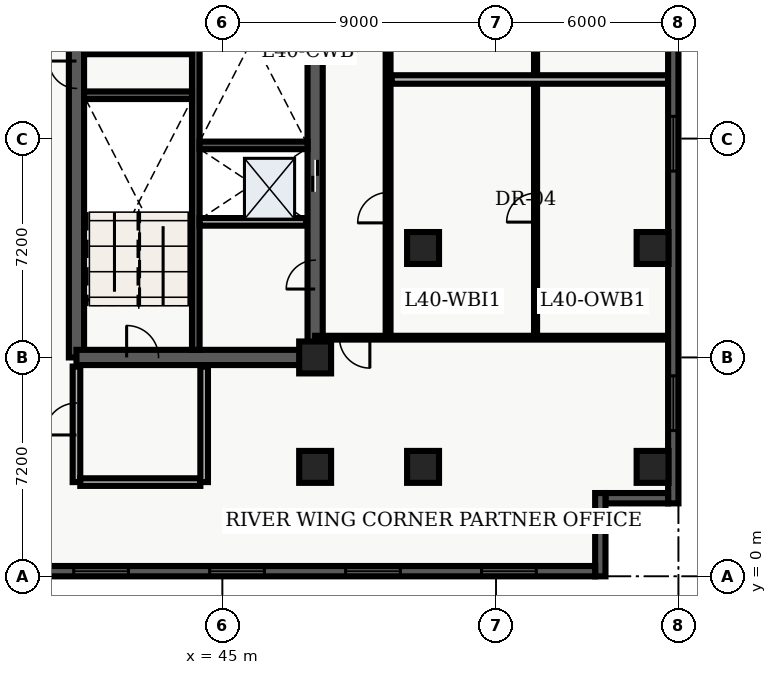
"""IFC4 building model, lengths in metres.
Left out: names, types, materials, properties, quantities, classifications, styles, units other than length and angle.
Written with IfcOpenShell. Run it as: python <this file> out.ifc"""

import sys

from ifc_helpers import new_model, entity, si_unit, converted_unit, direction, frame, origin_with_axes, origin_2d_with_axis, place, context, subcontext, project, spatial, polyline, rectangle, outline, extrude, element, fill, save


model = new_model("IFC4")
c1 = context("Model", 3, precision=1e-05, world=origin_with_axes(), true_north=direction((0.0, 1.0)))
c2 = subcontext(c1, "Body", "Model", "MODEL_VIEW")
j1 = project(units=[si_unit("LENGTHUNIT", "METRE"), converted_unit("PLANEANGLEUNIT", "DEGREE", entity("IfcPlaneAngleMeasure", 0.017), si_unit("PLANEANGLEUNIT", "RADIAN"), dimensions=[0, 0, 0, 0, 0, 0, 0])], contexts=[c1])
p1 = place(None, origin_with_axes())
s1 = spatial("IfcSite", under=j1, at=p1, CompositionType="ELEMENT")
p2 = place(p1, origin_with_axes())
s2 = spatial("IfcBuilding", under=s1, at=p2, CompositionType="ELEMENT")
p3 = place(p2, frame((0.0, 0.0, 164.1), z_axis=(0.0, 0.0, 1.0), x_axis=(1.0, 0.0, 0.0)))
s3 = spatial("IfcBuildingStorey", under=s2, at=p3, CompositionType="ELEMENT", Elevation=164.1)
p4 = place(p3, frame((40.2, 7.2, 0.0), z_axis=(0.0, 0.0, 1.0), x_axis=(0.0, 1.0, 0.0)))
e1 = element("IfcWall", 1, at=p4, inside=s3, PredefinedType="SHEAR", context=c2, shape_type="SweptSolid", body=[
    extrude(outline(polyline([(0.0, -0.25), (15.6, -0.25), (15.6, 0.25), (0.0, 0.25), (0.0, -0.25)])), origin_with_axes(), (0.0, 0.0, 1.0), 3.66),
])
p5 = place(p4, frame((14.475, 0.0, 0.0), z_axis=(0.0, 0.0, 1.0), x_axis=(1.0, 0.0, 0.0)))
e2 = element("IfcOpeningElement", 2, at=p5, cuts=e1, PredefinedType="OPENING", context=c2, shape_type="SweptSolid", body=[
    extrude(rectangle(XDim=1.05, YDim=0.52, at=origin_2d_with_axis()), origin_with_axes(), (0.0, 0.0, 1.0), 2.15),
])
p6 = place(p4, frame((12.75, 0.0, 0.0), z_axis=(0.0, 0.0, 1.0), x_axis=(1.0, 0.0, 0.0)))
e3 = element("IfcOpeningElement", 3, at=p6, cuts=e1, PredefinedType="OPENING", context=c2, shape_type="SweptSolid", body=[
    extrude(rectangle(XDim=1.2, YDim=0.52, at=origin_2d_with_axis()), origin_with_axes(), (0.0, 0.0, 1.0), 2.15),
])
p7 = place(p4, frame((9.3, 0.0, 0.0), z_axis=(0.0, 0.0, 1.0), x_axis=(1.0, 0.0, 0.0)))
e4 = element("IfcOpeningElement", 4, at=p7, cuts=e1, PredefinedType="OPENING", context=c2, shape_type="SweptSolid", body=[
    extrude(rectangle(XDim=0.9, YDim=0.52, at=origin_2d_with_axis()), origin_with_axes(), (0.0, 0.0, 1.0), 2.15),
])
p8 = place(p3, frame((40.2, 7.2, 0.0), z_axis=(0.0, 0.0, 1.0), x_axis=(1.0, 0.0, 0.0)))
e5 = element("IfcWall", 5, at=p8, inside=s3, PredefinedType="SHEAR", context=c2, shape_type="SweptSolid", body=[
    extrude(outline(polyline([(0.0, -0.25), (7.85, -0.25), (7.85, 0.25), (0.0, 0.25), (0.0, -0.25)])), origin_with_axes(), (0.0, 0.0, 1.0), 3.66),
])
p9 = place(p8, frame((2.175, 0.0, 0.0), z_axis=(0.0, 0.0, 1.0), x_axis=(1.0, 0.0, 0.0)))
e6 = element("IfcOpeningElement", 6, at=p9, cuts=e5, PredefinedType="OPENING", context=c2, shape_type="SweptSolid", body=[
    extrude(rectangle(XDim=1.05, YDim=0.52, at=origin_2d_with_axis()), origin_with_axes(), (0.0, 0.0, 1.0), 2.15),
])
p10 = place(p3, frame((48.05, 7.2, 0.0), z_axis=(0.0, 0.0, 1.0), x_axis=(0.0, 1.0, 0.0)))
e7 = element("IfcWall", 7, at=p10, inside=s3, PredefinedType="SHEAR", context=c2, shape_type="SweptSolid", body=[
    extrude(outline(polyline([(0.0, -0.25), (15.6, -0.25), (15.6, 0.25), (0.0, 0.25), (0.0, -0.25)])), origin_with_axes(), (0.0, 0.0, 1.0), 3.66),
])
p11 = place(p10, frame((5.975, 0.0, 0.0), z_axis=(0.0, 0.0, 1.0), x_axis=(1.0, 0.0, 0.0)))
e8 = element("IfcOpeningElement", 8, at=p11, cuts=e7, PredefinedType="OPENING", context=c2, shape_type="SweptSolid", body=[
    extrude(rectangle(XDim=1.05, YDim=0.52, at=origin_2d_with_axis()), origin_with_axes(), (0.0, 0.0, 1.0), 2.15),
])
p12 = place(p10, frame((2.725, 0.0, 0.0), z_axis=(0.0, 0.0, 1.0), x_axis=(1.0, 0.0, 0.0)))
e9 = element("IfcOpeningElement", 9, at=p12, cuts=e7, PredefinedType="OPENING", context=c2, shape_type="SweptSolid", body=[
    extrude(rectangle(XDim=0.95, YDim=0.52, at=origin_2d_with_axis()), origin_with_axes(), (0.0, 0.0, 1.0), 2.15),
])
p13 = place(p3, frame((44.125, 7.45, 0.0), z_axis=(0.0, 0.0, 1.0), x_axis=(0.0, 1.0, 0.0)))
e10 = element("IfcWall", 10, at=p13, inside=s3, PredefinedType="SHEAR", context=c2, shape_type="SweptSolid", body=[
    extrude(outline(polyline([(0.0, -0.125), (15.1, -0.125), (15.1, 0.125), (0.0, 0.125), (0.0, -0.125)])), origin_with_axes(), (0.0, 0.0, 1.0), 3.66),
])
for number, where, z_axis, x_axis in (
    (11, (40.45, 15.825, 0.0), (0.0, 0.0, 1.0), (1.0, 0.0, 0.0)),
    (12, (44.25, 14.175, 0.0), (0.0, 0.0, 1.0), (1.0, 0.0, 0.0)),
):
    element("IfcWall", number, at=place(p3, frame(where, z_axis=z_axis, x_axis=x_axis)), inside=s3, PredefinedType="SHEAR", context=c2, shape_type="SweptSolid", body=[
        extrude(outline(polyline([(0.0, -0.125), (3.55, -0.125), (3.55, 0.125), (0.0, 0.125), (0.0, -0.125)])), origin_with_axes(), (0.0, 0.0, 1.0), 3.66),
    ])
p14 = place(p3, frame((40.5, 17.3, 0.0), z_axis=(0.0, 0.0, 1.0), x_axis=(1.0, 0.0, 0.0)))
e13 = element("IfcWall", 13, at=p14, inside=s3, PredefinedType="SOLIDWALL", context=c2, shape_type="SweptSolid", body=[
    extrude(outline(polyline([(0.0, -0.125), (3.5, -0.125), (3.5, 0.125), (0.0, 0.125), (0.0, -0.125)])), origin_with_axes(), (0.0, 0.0, 1.0), 2.7),
])
p15 = place(p14, frame((2.4, 0.0, 0.0), z_axis=(0.0, 0.0, 1.0), x_axis=(1.0, 0.0, 0.0)))
e14 = element("IfcOpeningElement", 14, at=p15, cuts=e13, PredefinedType="OPENING", context=c2, shape_type="SweptSolid", body=[
    extrude(rectangle(XDim=0.9, YDim=0.27, at=origin_2d_with_axis()), origin_with_axes(), (0.0, 0.0, 1.0), 2.15),
])
p16 = place(p3, frame((40.2, 3.1, 0.0), z_axis=(0.0, 0.0, 1.0), x_axis=(0.0, 1.0, 0.0)))
e15 = element("IfcWall", 15, at=p16, inside=s3, PredefinedType="SOLIDWALL", context=c2, shape_type="SweptSolid", body=[
    extrude(outline(polyline([(0.0, -0.125), (3.8, -0.125), (3.8, 0.125), (0.0, 0.125), (0.0, -0.125)])), origin_with_axes(), (0.0, 0.0, 1.0), 2.7),
])
p17 = place(p16, frame((2.075, 0.0, 0.0), z_axis=(0.0, 0.0, 1.0), x_axis=(1.0, 0.0, 0.0)))
e16 = element("IfcOpeningElement", 16, at=p17, cuts=e15, PredefinedType="OPENING", context=c2, shape_type="SweptSolid", body=[
    extrude(rectangle(XDim=1.05, YDim=0.27, at=origin_2d_with_axis()), origin_with_axes(), (0.0, 0.0, 1.0), 2.15),
])
p18 = place(p3, frame((40.325, 3.1, 0.0), z_axis=(0.0, 0.0, 1.0), x_axis=(1.0, 0.0, 0.0)))
e17 = element("IfcWall", 17, at=p18, inside=s3, PredefinedType="SOLIDWALL", context=c2, shape_type="SweptSolid", body=[
    extrude(outline(polyline([(0.0, -0.125), (3.95, -0.125), (3.95, 0.125), (0.0, 0.125), (0.0, -0.125)])), origin_with_axes(), (0.0, 0.0, 1.0), 2.7),
])
p19 = place(p3, frame((44.4, 3.1, 0.0), z_axis=(0.0, 0.0, 1.0), x_axis=(0.0, 1.0, 0.0)))
e18 = element("IfcWall", 18, at=p19, inside=s3, PredefinedType="SOLIDWALL", context=c2, shape_type="SweptSolid", body=[
    extrude(outline(polyline([(0.0, -0.125), (3.8, -0.125), (3.8, 0.125), (0.0, 0.125), (0.0, -0.125)])), origin_with_axes(), (0.0, 0.0, 1.0), 2.7),
])
for number, where, z_axis, x_axis in (
    (19, (48.05, 3.6, 0.0), (0.0, 0.0, 1.0), (1.0, 0.0, 0.0)),
    (20, (48.05, 7.2, 0.0), (0.0, 0.0, 1.0), (1.0, 0.0, 0.0)),
    (21, (51.6, 3.6, 0.0), (0.0, 0.0, 1.0), (1.0, 0.0, 0.0)),
    (22, (51.6, 10.8, 0.0), (0.0, 0.0, 1.0), (1.0, 0.0, 0.0)),
    (23, (59.15, 3.6, 0.0), (0.0, 0.0, 1.0), (1.0, 0.0, 0.0)),
    (24, (59.15, 10.8, 0.0), (0.0, 0.0, 1.0), (1.0, 0.0, 0.0)),
):
    element("IfcColumn", number, at=place(p3, frame(where, z_axis=z_axis, x_axis=x_axis)), inside=s3, PredefinedType="COLUMN", context=c2, shape_type="SweptSolid", body=[
        extrude(rectangle(XDim=1.05, YDim=1.05, at=origin_2d_with_axis()), origin_with_axes(), (0.0, 0.0, 1.0), 3.9),
    ])
p20 = place(p3, frame((44.25, 11.66, 0.0), z_axis=(0.0, 0.0, 1.0), x_axis=(1.0, 0.0, 0.0)))
e25 = element("IfcWall", 25, at=p20, inside=s3, PredefinedType="SOLIDWALL", context=c2, shape_type="SweptSolid", body=[
    extrude(outline(polyline([(0.0, -0.125), (3.5, -0.125), (3.5, 0.125), (0.0, 0.125), (0.0, -0.125)])), origin_with_axes(), (0.0, 0.0, 1.0), 2.7),
])
p21 = place(p3, frame((50.45, 7.85, 0.0), z_axis=(0.0, 0.0, 1.0), x_axis=(0.0, 1.0, 0.0)))
e26 = element("IfcWall", 26, at=p21, inside=s3, PredefinedType="PARTITIONING", context=c2, shape_type="SweptSolid", body=[
    extrude(outline(polyline([(0.0, -0.08), (18.8, -0.08), (18.8, 0.08), (0.0, 0.08), (0.0, -0.08)])), origin_with_axes(), (0.0, 0.0, 1.0), 2.7),
])
p22 = place(p21, frame((4.277, 0.0, 0.0), z_axis=(0.0, 0.0, 1.0), x_axis=(1.0, 0.0, 0.0)))
e27 = element("IfcOpeningElement", 27, at=p22, cuts=e26, PredefinedType="OPENING", context=c2, shape_type="SweptSolid", body=[
    extrude(rectangle(XDim=1.0, YDim=0.18, at=origin_2d_with_axis()), origin_with_axes(), (0.0, 0.0, 1.0), 2.15),
])
p23 = place(p21, frame((13.617, 0.0, 0.0), z_axis=(0.0, 0.0, 1.0), x_axis=(1.0, 0.0, 0.0)))
e28 = element("IfcOpeningElement", 28, at=p23, cuts=e26, PredefinedType="OPENING", context=c2, shape_type="SweptSolid", body=[
    extrude(rectangle(XDim=1.0, YDim=0.18, at=origin_2d_with_axis()), origin_with_axes(), (0.0, 0.0, 1.0), 2.15),
])
p24 = place(p3, frame((59.665, 7.85, 0.0), z_axis=(0.0, 0.0, 1.0), x_axis=(-1.0, 0.0, 0.0)))
e29 = element("IfcWall", 29, at=p24, inside=s3, PredefinedType="PARTITIONING", context=c2, shape_type="SweptSolid", body=[
    extrude(outline(polyline([(0.0, -0.062), (11.615, -0.062), (11.615, 0.062), (0.0, 0.062), (0.0, -0.062)])), origin_with_axes(), (0.0, 0.0, 1.0), 2.7),
])
p25 = place(p24, frame((10.315, 0.0, 0.0), z_axis=(0.0, 0.0, 1.0), x_axis=(1.0, 0.0, 0.0)))
e30 = element("IfcOpeningElement", 30, at=p25, cuts=e29, PredefinedType="OPENING", context=c2, shape_type="SweptSolid", body=[
    extrude(rectangle(XDim=1.0, YDim=0.145, at=origin_2d_with_axis()), origin_with_axes(), (0.0, 0.0, 1.0), 2.15),
])
p26 = place(p3, frame((55.3, 7.98, 0.0), z_axis=(0.0, 0.0, 1.0), x_axis=(0.0, 1.0, 0.0)))
e31 = element("IfcWall", 31, at=p26, inside=s3, PredefinedType="PARTITIONING", context=c2, shape_type="SweptSolid", body=[
    extrude(outline(polyline([(0.0, -0.05), (18.54, -0.05), (18.54, 0.05), (0.0, 0.05), (0.0, -0.05)])), origin_with_axes(), (0.0, 0.0, 1.0), 2.7),
])
p27 = place(p26, frame((4.146, 0.0, 0.0), z_axis=(0.0, 0.0, 1.0), x_axis=(1.0, 0.0, 0.0)))
e32 = element("IfcOpeningElement", 32, at=p27, cuts=e31, PredefinedType="OPENING", context=c2, shape_type="SweptSolid", body=[
    extrude(rectangle(XDim=0.95, YDim=0.12, at=origin_2d_with_axis()), origin_with_axes(), (0.0, 0.0, 1.0), 2.15),
])
p28 = place(p26, frame((13.486, 0.0, 0.0), z_axis=(0.0, 0.0, 1.0), x_axis=(1.0, 0.0, 0.0)))
e33 = element("IfcOpeningElement", 33, at=p28, cuts=e31, PredefinedType="OPENING", context=c2, shape_type="SweptSolid", body=[
    extrude(rectangle(XDim=0.95, YDim=0.12, at=origin_2d_with_axis()), origin_with_axes(), (0.0, 0.0, 1.0), 2.15),
])
p29 = place(p3, frame((50.57, 16.343, 0.0), z_axis=(0.0, 0.0, 1.0), x_axis=(1.0, 0.0, 0.0)))
e34 = element("IfcWall", 34, at=p29, inside=s3, PredefinedType="PARTITIONING", context=c2, shape_type="SweptSolid", body=[
    extrude(outline(polyline([(0.0, -0.14), (9.095, -0.14), (9.095, 0.14), (0.0, 0.14), (0.0, -0.14)])), origin_with_axes(), (0.0, 0.0, 1.0), 2.7),
])
p30 = place(p3, frame((59.83, 26.06, 0.0), z_axis=(0.0, 0.0, 1.0), x_axis=(0.0, -1.0, 0.0)))
e35 = element("IfcWall", 35, at=p30, inside=s3, PredefinedType="SOLIDWALL", context=c2, shape_type="SweptSolid", body=[
    extrude(outline(polyline([(0.0, -0.17), (23.66, -0.17), (23.66, 0.17), (0.0, 0.17), (0.0, -0.17)])), origin_with_axes(), (0.0, 0.0, 1.0), 3.66),
])
p31 = place(p30, frame((3.696, 0.0, 0.45), z_axis=(0.0, 0.0, 1.0), x_axis=(1.0, 0.0, 0.0)))
e36 = element("IfcOpeningElement", 36, at=p31, cuts=e35, PredefinedType="OPENING", context=c2, shape_type="SweptSolid", body=[
    extrude(rectangle(XDim=1.8, YDim=0.36, at=origin_2d_with_axis()), origin_with_axes(), (0.0, 0.0, 1.0), 2.1),
])
p32 = place(p30, frame((11.83, 0.0, 0.45), z_axis=(0.0, 0.0, 1.0), x_axis=(1.0, 0.0, 0.0)))
e37 = element("IfcOpeningElement", 37, at=p32, cuts=e35, PredefinedType="OPENING", context=c2, shape_type="SweptSolid", body=[
    extrude(rectangle(XDim=1.8, YDim=0.36, at=origin_2d_with_axis()), origin_with_axes(), (0.0, 0.0, 1.0), 2.1),
])
p33 = place(p30, frame((20.364, 0.0, 0.45), z_axis=(0.0, 0.0, 1.0), x_axis=(1.0, 0.0, 0.0)))
e38 = element("IfcOpeningElement", 38, at=p33, cuts=e35, PredefinedType="OPENING", context=c2, shape_type="SweptSolid", body=[
    extrude(rectangle(XDim=1.8, YDim=0.36, at=origin_2d_with_axis()), origin_with_axes(), (0.0, 0.0, 1.0), 2.1),
])
p34 = place(p3, frame((59.66, 2.57, 0.0), z_axis=(0.0, 0.0, 1.0), x_axis=(-1.0, 0.0, 0.0)))
e39 = element("IfcWall", 39, at=p34, inside=s3, PredefinedType="SOLIDWALL", context=c2, shape_type="SweptSolid", body=[
    extrude(outline(polyline([(0.0, -0.17), (2.06, -0.17), (2.06, 0.17), (0.0, 0.17), (0.0, -0.17)])), origin_with_axes(), (0.0, 0.0, 1.0), 3.66),
])
p35 = place(p3, frame((57.43, 2.74, 0.0), z_axis=(0.0, 0.0, 1.0), x_axis=(0.0, -1.0, 0.0)))
e40 = element("IfcWall", 40, at=p35, inside=s3, PredefinedType="SOLIDWALL", context=c2, shape_type="SweptSolid", body=[
    extrude(outline(polyline([(0.0, -0.17), (2.74, -0.17), (2.74, 0.17), (0.0, 0.17), (0.0, -0.17)])), origin_with_axes(), (0.0, 0.0, 1.0), 3.66),
])
p36 = place(p3, frame((57.26, 0.17, 0.0), z_axis=(0.0, 0.0, 1.0), x_axis=(-1.0, 0.0, 0.0)))
e41 = element("IfcWall", 41, at=p36, inside=s3, PredefinedType="SOLIDWALL", context=c2, shape_type="SweptSolid", body=[
    extrude(outline(polyline([(0.0, -0.17), (54.86, -0.17), (54.86, 0.17), (0.0, 0.17), (0.0, -0.17)])), origin_with_axes(), (0.0, 0.0, 1.0), 3.66),
])
p37 = place(p36, frame((2.836, 0.0, 0.45), z_axis=(0.0, 0.0, 1.0), x_axis=(1.0, 0.0, 0.0)))
e42 = element("IfcOpeningElement", 42, at=p37, cuts=e41, PredefinedType="OPENING", context=c2, shape_type="SweptSolid", body=[
    extrude(rectangle(XDim=1.8, YDim=0.36, at=origin_2d_with_axis()), origin_with_axes(), (0.0, 0.0, 1.0), 2.1),
])
p38 = place(p36, frame((7.307, 0.0, 0.45), z_axis=(0.0, 0.0, 1.0), x_axis=(1.0, 0.0, 0.0)))
e43 = element("IfcOpeningElement", 43, at=p38, cuts=e41, PredefinedType="OPENING", context=c2, shape_type="SweptSolid", body=[
    extrude(rectangle(XDim=1.8, YDim=0.36, at=origin_2d_with_axis()), origin_with_axes(), (0.0, 0.0, 1.0), 2.1),
])
p39 = place(p36, frame((11.779, 0.0, 0.45), z_axis=(0.0, 0.0, 1.0), x_axis=(1.0, 0.0, 0.0)))
e44 = element("IfcOpeningElement", 44, at=p39, cuts=e41, PredefinedType="OPENING", context=c2, shape_type="SweptSolid", body=[
    extrude(rectangle(XDim=1.8, YDim=0.36, at=origin_2d_with_axis()), origin_with_axes(), (0.0, 0.0, 1.0), 2.1),
])
p40 = place(p36, frame((16.251, 0.0, 0.45), z_axis=(0.0, 0.0, 1.0), x_axis=(1.0, 0.0, 0.0)))
e45 = element("IfcOpeningElement", 45, at=p40, cuts=e41, PredefinedType="OPENING", context=c2, shape_type="SweptSolid", body=[
    extrude(rectangle(XDim=1.8, YDim=0.36, at=origin_2d_with_axis()), origin_with_axes(), (0.0, 0.0, 1.0), 2.1),
])
p41 = place(p36, frame((20.723, 0.0, 0.45), z_axis=(0.0, 0.0, 1.0), x_axis=(1.0, 0.0, 0.0)))
e46 = element("IfcOpeningElement", 46, at=p41, cuts=e41, PredefinedType="OPENING", context=c2, shape_type="SweptSolid", body=[
    extrude(rectangle(XDim=1.8, YDim=0.36, at=origin_2d_with_axis()), origin_with_axes(), (0.0, 0.0, 1.0), 2.1),
])
p42 = place(p36, frame((25.194, 0.0, 0.45), z_axis=(0.0, 0.0, 1.0), x_axis=(1.0, 0.0, 0.0)))
e47 = element("IfcOpeningElement", 47, at=p42, cuts=e41, PredefinedType="OPENING", context=c2, shape_type="SweptSolid", body=[
    extrude(rectangle(XDim=1.8, YDim=0.36, at=origin_2d_with_axis()), origin_with_axes(), (0.0, 0.0, 1.0), 2.1),
])
p43 = place(p36, frame((34.138, 0.0, 0.45), z_axis=(0.0, 0.0, 1.0), x_axis=(1.0, 0.0, 0.0)))
e48 = element("IfcOpeningElement", 48, at=p43, cuts=e41, PredefinedType="OPENING", context=c2, shape_type="SweptSolid", body=[
    extrude(rectangle(XDim=1.8, YDim=0.36, at=origin_2d_with_axis()), origin_with_axes(), (0.0, 0.0, 1.0), 2.1),
])
p44 = place(p36, frame((38.609, 0.0, 0.45), z_axis=(0.0, 0.0, 1.0), x_axis=(1.0, 0.0, 0.0)))
e49 = element("IfcOpeningElement", 49, at=p44, cuts=e41, PredefinedType="OPENING", context=c2, shape_type="SweptSolid", body=[
    extrude(rectangle(XDim=1.8, YDim=0.36, at=origin_2d_with_axis()), origin_with_axes(), (0.0, 0.0, 1.0), 2.1),
])
p45 = place(p36, frame((43.081, 0.0, 0.45), z_axis=(0.0, 0.0, 1.0), x_axis=(1.0, 0.0, 0.0)))
e50 = element("IfcOpeningElement", 50, at=p45, cuts=e41, PredefinedType="OPENING", context=c2, shape_type="SweptSolid", body=[
    extrude(rectangle(XDim=1.8, YDim=0.36, at=origin_2d_with_axis()), origin_with_axes(), (0.0, 0.0, 1.0), 2.1),
])
p46 = place(p36, frame((47.553, 0.0, 0.45), z_axis=(0.0, 0.0, 1.0), x_axis=(1.0, 0.0, 0.0)))
e51 = element("IfcOpeningElement", 51, at=p46, cuts=e41, PredefinedType="OPENING", context=c2, shape_type="SweptSolid", body=[
    extrude(rectangle(XDim=1.8, YDim=0.36, at=origin_2d_with_axis()), origin_with_axes(), (0.0, 0.0, 1.0), 2.1),
])
p47 = place(p36, frame((52.024, 0.0, 0.45), z_axis=(0.0, 0.0, 1.0), x_axis=(1.0, 0.0, 0.0)))
e52 = element("IfcOpeningElement", 52, at=p47, cuts=e41, PredefinedType="OPENING", context=c2, shape_type="SweptSolid", body=[
    extrude(rectangle(XDim=1.8, YDim=0.36, at=origin_2d_with_axis()), origin_with_axes(), (0.0, 0.0, 1.0), 2.1),
])
p48 = place(p10, frame((5.975, 0.0, 0.0), z_axis=(0.0, 0.0, 1.0), x_axis=(1.0, 0.0, 0.0)))
e53 = element("IfcDoor", 53, at=p48, inside=s3, OperationType="SLIDING_TO_LEFT", PredefinedType="DOOR", context=c2, shape_type="SweptSolid", body=[
    extrude(rectangle(XDim=1.05, YDim=0.09, at=origin_2d_with_axis()), origin_with_axes(), (0.0, 0.0, 1.0), 2.15),
])
fill(e8, e53)
p49 = place(p4, frame((9.3, 0.0, 0.0), z_axis=(0.0, 0.0, 1.0), x_axis=(1.0, 0.0, 0.0)))
e54 = element("IfcDoor", 54, at=p49, inside=s3, OperationType="SINGLE_SWING_RIGHT", PredefinedType="DOOR", context=c2, shape_type="SweptSolid", body=[
    extrude(rectangle(XDim=0.9, YDim=0.09, at=origin_2d_with_axis()), origin_with_axes(), (0.0, 0.0, 1.0), 2.15),
])
fill(e4, e54)
p50 = place(p8, frame((2.175, 0.0, 0.0), z_axis=(0.0, 0.0, 1.0), x_axis=(1.0, 0.0, 0.0)))
e55 = element("IfcDoor", 55, at=p50, inside=s3, OperationType="SINGLE_SWING_LEFT", PredefinedType="DOOR", context=c2, shape_type="SweptSolid", body=[
    extrude(rectangle(XDim=1.05, YDim=0.09, at=origin_2d_with_axis()), origin_with_axes(), (0.0, 0.0, 1.0), 2.15),
])
fill(e6, e55)
p51 = place(p16, frame((2.075, 0.0, 0.0), z_axis=(0.0, 0.0, 1.0), x_axis=(1.0, 0.0, 0.0)))
e56 = element("IfcDoor", 56, at=p51, inside=s3, OperationType="SINGLE_SWING_LEFT", PredefinedType="DOOR", context=c2, shape_type="SweptSolid", body=[
    extrude(rectangle(XDim=1.05, YDim=0.09, at=origin_2d_with_axis()), origin_with_axes(), (0.0, 0.0, 1.0), 2.15),
])
fill(e16, e56)
p52 = place(p10, frame((2.725, 0.0, 0.0), z_axis=(0.0, 0.0, 1.0), x_axis=(1.0, 0.0, 0.0)))
e57 = element("IfcDoor", 57, at=p52, inside=s3, OperationType="SINGLE_SWING_LEFT", PredefinedType="DOOR", context=c2, shape_type="SweptSolid", body=[
    extrude(rectangle(XDim=0.95, YDim=0.09, at=origin_2d_with_axis()), origin_with_axes(), (0.0, 0.0, 1.0), 2.15),
])
fill(e9, e57)
p53 = place(p24, frame((10.315, 0.0, 0.0), z_axis=(0.0, 0.0, 1.0), x_axis=(1.0, 0.0, 0.0)))
e58 = element("IfcDoor", 58, at=p53, inside=s3, OperationType="SINGLE_SWING_LEFT", PredefinedType="DOOR", context=c2, shape_type="SweptSolid", body=[
    extrude(rectangle(XDim=1.0, YDim=0.075, at=origin_2d_with_axis()), origin_with_axes(), (0.0, 0.0, 1.0), 2.15),
])
fill(e30, e58)
p54 = place(p26, frame((4.146, 0.0, 0.0), z_axis=(0.0, 0.0, 1.0), x_axis=(1.0, 0.0, 0.0)))
e59 = element("IfcDoor", 59, at=p54, inside=s3, OperationType="SINGLE_SWING_LEFT", PredefinedType="DOOR", context=c2, shape_type="SweptSolid", body=[
    extrude(rectangle(XDim=0.95, YDim=0.06, at=origin_2d_with_axis()), origin_with_axes(), (0.0, 0.0, 1.0), 2.15),
])
fill(e32, e59)
p55 = place(p21, frame((4.277, 0.0, 0.0), z_axis=(0.0, 0.0, 1.0), x_axis=(1.0, 0.0, 0.0)))
e60 = element("IfcDoor", 60, at=p55, inside=s3, OperationType="SINGLE_SWING_LEFT", PredefinedType="DOOR", context=c2, shape_type="SweptSolid", body=[
    extrude(rectangle(XDim=1.0, YDim=0.09, at=origin_2d_with_axis()), origin_with_axes(), (0.0, 0.0, 1.0), 2.15),
])
fill(e27, e60)
p56 = place(p30, frame((11.83, 0.0, 0.45), z_axis=(0.0, 0.0, 1.0), x_axis=(1.0, 0.0, 0.0)))
e61 = element("IfcWindow", 61, at=p56, inside=s3, PredefinedType="WINDOW", context=c2, shape_type="SweptSolid", body=[
    extrude(rectangle(XDim=1.8, YDim=0.09, at=origin_2d_with_axis()), origin_with_axes(), (0.0, 0.0, 1.0), 2.1),
])
fill(e37, e61)
p57 = place(p30, frame((20.364, 0.0, 0.45), z_axis=(0.0, 0.0, 1.0), x_axis=(1.0, 0.0, 0.0)))
e62 = element("IfcWindow", 62, at=p57, inside=s3, PredefinedType="WINDOW", context=c2, shape_type="SweptSolid", body=[
    extrude(rectangle(XDim=1.8, YDim=0.09, at=origin_2d_with_axis()), origin_with_axes(), (0.0, 0.0, 1.0), 2.1),
])
fill(e38, e62)
p58 = place(p36, frame((2.836, 0.0, 0.45), z_axis=(0.0, 0.0, 1.0), x_axis=(1.0, 0.0, 0.0)))
e63 = element("IfcWindow", 63, at=p58, inside=s3, PredefinedType="WINDOW", context=c2, shape_type="SweptSolid", body=[
    extrude(rectangle(XDim=1.8, YDim=0.09, at=origin_2d_with_axis()), origin_with_axes(), (0.0, 0.0, 1.0), 2.1),
])
fill(e42, e63)
p59 = place(p36, frame((7.307, 0.0, 0.45), z_axis=(0.0, 0.0, 1.0), x_axis=(1.0, 0.0, 0.0)))
e64 = element("IfcWindow", 64, at=p59, inside=s3, PredefinedType="WINDOW", context=c2, shape_type="SweptSolid", body=[
    extrude(rectangle(XDim=1.8, YDim=0.09, at=origin_2d_with_axis()), origin_with_axes(), (0.0, 0.0, 1.0), 2.1),
])
fill(e43, e64)
p60 = place(p36, frame((11.779, 0.0, 0.45), z_axis=(0.0, 0.0, 1.0), x_axis=(1.0, 0.0, 0.0)))
e65 = element("IfcWindow", 65, at=p60, inside=s3, PredefinedType="WINDOW", context=c2, shape_type="SweptSolid", body=[
    extrude(rectangle(XDim=1.8, YDim=0.09, at=origin_2d_with_axis()), origin_with_axes(), (0.0, 0.0, 1.0), 2.1),
])
fill(e44, e65)
p61 = place(p36, frame((16.251, 0.0, 0.45), z_axis=(0.0, 0.0, 1.0), x_axis=(1.0, 0.0, 0.0)))
e66 = element("IfcWindow", 66, at=p61, inside=s3, PredefinedType="WINDOW", context=c2, shape_type="SweptSolid", body=[
    extrude(rectangle(XDim=1.8, YDim=0.09, at=origin_2d_with_axis()), origin_with_axes(), (0.0, 0.0, 1.0), 2.1),
])
fill(e45, e66)
save(model, sys.argv[1])
